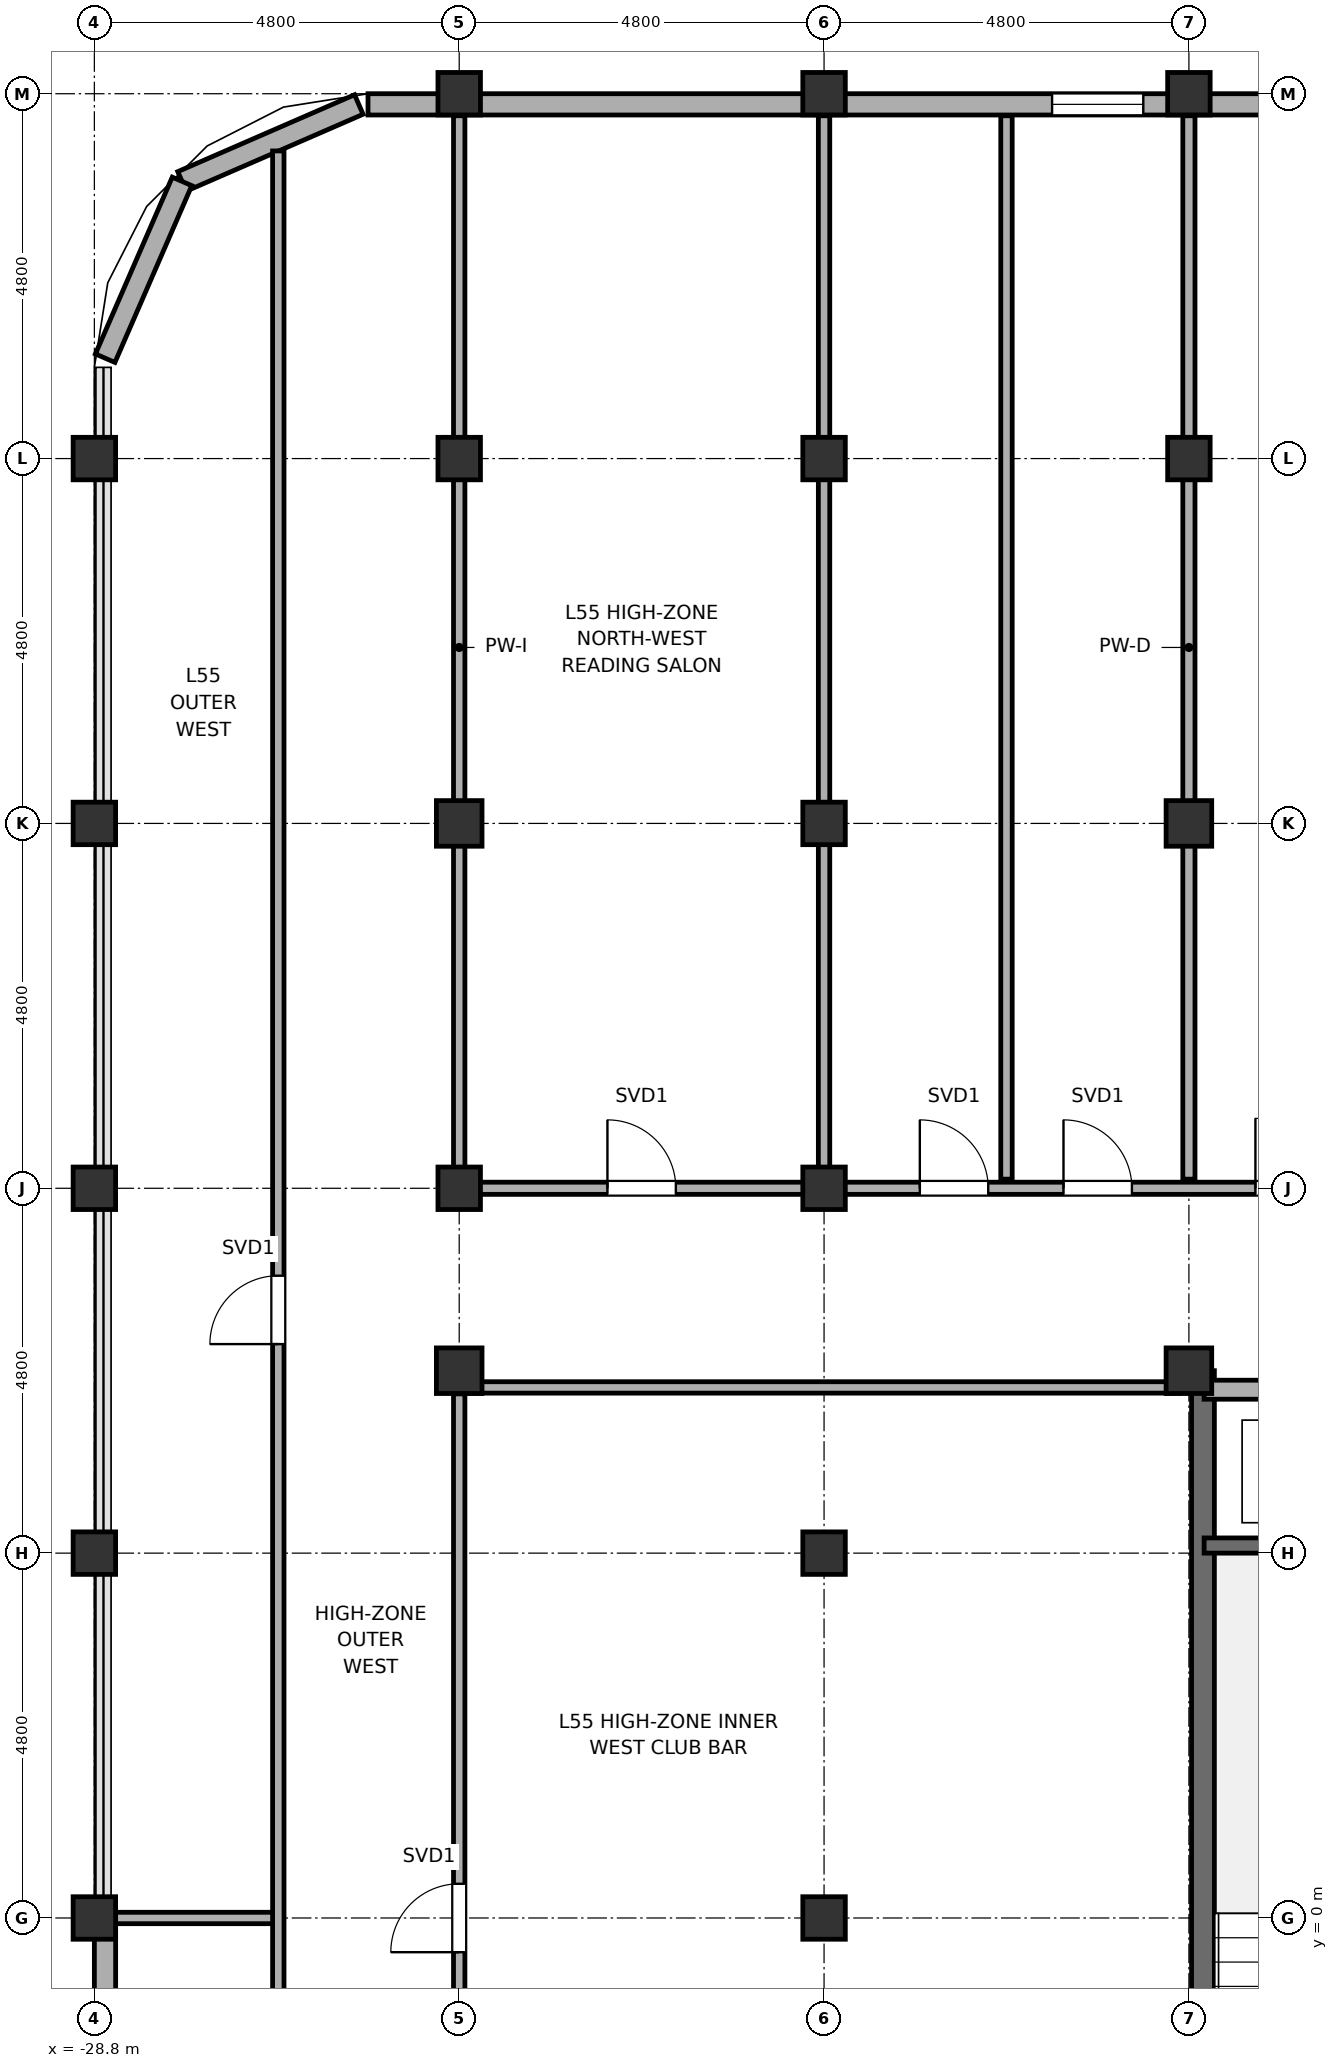
"""IFC4 building model, lengths in metres.
Left out: names, types, materials, properties, quantities, classifications, styles, units other than length and angle.
Written with IfcOpenShell. Run it as: python <this file> out.ifc"""

import sys

from ifc_helpers import new_model, si_unit, direction, frame, frame_2d, origin, origin_2d, place, context, subcontext, project, spatial, rectangle, hollow_rectangle, hollow_circle, extrude, element, fill, save


model = new_model("IFC4")
c1 = context("Model", 3, precision=1e-05, world=origin(), true_north=direction((0.0, 1.0)))
c2 = subcontext(c1, "Body", "Model", "MODEL_VIEW")
j1 = project(units=[si_unit("LENGTHUNIT", "METRE"), si_unit("PLANEANGLEUNIT", "RADIAN")], contexts=[c1])
p1 = place(None, origin())
s1 = spatial("IfcSite", under=j1, at=p1, CompositionType="ELEMENT")
p2 = place(p1, origin())
s2 = spatial("IfcBuilding", under=s1, at=p2, CompositionType="ELEMENT")
p3 = place(p2, frame((0.0, 0.0, 222.3)))
s3 = spatial("IfcBuildingStorey", under=s2, at=p3, CompositionType="ELEMENT", Elevation=222.3)
for number, where, z_axis, x_axis in (
    (1, (-28.8, 0.0, 0.0), (0.0, 0.0, 1.0), (1.0, 0.0, 0.0)),
    (2, (-28.8, 4.8, 0.0), (0.0, 0.0, 1.0), (1.0, 0.0, 0.0)),
    (3, (-28.8, 9.6, 0.0), (0.0, 0.0, 1.0), (1.0, 0.0, 0.0)),
    (4, (-28.8, 14.4, 0.0), (0.0, 0.0, 1.0), (1.0, 0.0, 0.0)),
    (5, (-28.8, 19.2, 0.0), (0.0, 0.0, 1.0), (1.0, 0.0, 0.0)),
):
    element("IfcColumn", number, at=place(p3, frame(where, z_axis=z_axis, x_axis=x_axis)), inside=s3, PredefinedType="COLUMN", context=c2, shape_type="SweptSolid", body=[
        extrude(hollow_circle(Radius=0.28, WallThickness=0.025, at=origin_2d()), origin(), (0.0, 0.0, 1.0), 3.85),
    ])
p4 = place(p3, frame((-24.0, 7.2, 0.0), z_axis=(0.0, 0.0, 1.0), x_axis=(1.0, 0.0, 0.0)))
e6 = element("IfcColumn", 6, at=p4, inside=s3, PredefinedType="COLUMN", context=c2, shape_type="SweptSolid", body=[
    extrude(hollow_rectangle(XDim=0.6, YDim=0.6, WallThickness=0.028, at=origin_2d()), origin(), (0.0, 0.0, 1.0), 3.85),
])
p5 = place(p3, frame((-24.0, 9.6, 0.0), z_axis=(0.0, 0.0, 1.0), x_axis=(1.0, 0.0, 0.0)))
e7 = element("IfcColumn", 7, at=p5, inside=s3, PredefinedType="COLUMN", context=c2, shape_type="SweptSolid", body=[
    extrude(hollow_circle(Radius=0.28, WallThickness=0.025, at=origin_2d()), origin(), (0.0, 0.0, 1.0), 3.85),
])
p6 = place(p3, frame((-24.0, 14.4, 0.0), z_axis=(0.0, 0.0, 1.0), x_axis=(1.0, 0.0, 0.0)))
e8 = element("IfcColumn", 8, at=p6, inside=s3, PredefinedType="COLUMN", context=c2, shape_type="SweptSolid", body=[
    extrude(hollow_rectangle(XDim=0.6, YDim=0.6, WallThickness=0.028, at=origin_2d()), origin(), (0.0, 0.0, 1.0), 3.85),
])
p7 = place(p3, frame((-24.0, 19.2, 0.0), z_axis=(0.0, 0.0, 1.0), x_axis=(1.0, 0.0, 0.0)))
e9 = element("IfcColumn", 9, at=p7, inside=s3, PredefinedType="COLUMN", context=c2, shape_type="SweptSolid", body=[
    extrude(hollow_circle(Radius=0.28, WallThickness=0.025, at=origin_2d()), origin(), (0.0, 0.0, 1.0), 3.85),
])
p8 = place(p3, frame((-24.0, 24.0, -0.18), z_axis=(0.0, 0.0, 1.0), x_axis=(1.0, 0.0, 0.0)))
e10 = element("IfcColumn", 10, at=p8, inside=s3, PredefinedType="COLUMN", context=c2, shape_type="SweptSolid", body=[
    extrude(hollow_circle(Radius=0.28, WallThickness=0.025, at=origin_2d()), origin(), (0.0, 0.0, 1.0), 4.03),
])
for number, where, z_axis, x_axis in (
    (11, (-19.2, 0.0, 0.0), (0.0, 0.0, 1.0), (1.0, 0.0, 0.0)),
    (12, (-19.2, 4.8, 0.0), (0.0, 0.0, 1.0), (1.0, 0.0, 0.0)),
    (13, (-19.2, 9.6, 0.0), (0.0, 0.0, 1.0), (1.0, 0.0, 0.0)),
    (14, (-19.2, 14.4, 0.0), (0.0, 0.0, 1.0), (1.0, 0.0, 0.0)),
    (15, (-19.2, 19.2, 0.0), (0.0, 0.0, 1.0), (1.0, 0.0, 0.0)),
):
    element("IfcColumn", number, at=place(p3, frame(where, z_axis=z_axis, x_axis=x_axis)), inside=s3, PredefinedType="COLUMN", context=c2, shape_type="SweptSolid", body=[
        extrude(hollow_circle(Radius=0.28, WallThickness=0.025, at=origin_2d()), origin(), (0.0, 0.0, 1.0), 3.85),
    ])
p9 = place(p3, frame((-19.2, 24.0, -0.18), z_axis=(0.0, 0.0, 1.0), x_axis=(1.0, 0.0, 0.0)))
e16 = element("IfcColumn", 16, at=p9, inside=s3, PredefinedType="COLUMN", context=c2, shape_type="SweptSolid", body=[
    extrude(hollow_circle(Radius=0.28, WallThickness=0.025, at=origin_2d()), origin(), (0.0, 0.0, 1.0), 4.03),
])
for number, where, z_axis, x_axis in (
    (17, (-14.4, 7.2, 0.0), (0.0, 0.0, 1.0), (1.0, 0.0, 0.0)),
    (18, (-14.4, 14.4, 0.0), (0.0, 0.0, 1.0), (1.0, 0.0, 0.0)),
):
    element("IfcColumn", number, at=place(p3, frame(where, z_axis=z_axis, x_axis=x_axis)), inside=s3, PredefinedType="COLUMN", context=c2, shape_type="SweptSolid", body=[
        extrude(hollow_rectangle(XDim=0.6, YDim=0.6, WallThickness=0.028, at=origin_2d()), origin(), (0.0, 0.0, 1.0), 3.85),
    ])
p10 = place(p3, frame((-14.4, 19.2, 0.0), z_axis=(0.0, 0.0, 1.0), x_axis=(1.0, 0.0, 0.0)))
e19 = element("IfcColumn", 19, at=p10, inside=s3, PredefinedType="COLUMN", context=c2, shape_type="SweptSolid", body=[
    extrude(hollow_circle(Radius=0.28, WallThickness=0.025, at=origin_2d()), origin(), (0.0, 0.0, 1.0), 3.85),
])
p11 = place(p3, frame((-14.4, 24.0, -0.18), z_axis=(0.0, 0.0, 1.0), x_axis=(1.0, 0.0, 0.0)))
e20 = element("IfcColumn", 20, at=p11, inside=s3, PredefinedType="COLUMN", context=c2, shape_type="SweptSolid", body=[
    extrude(hollow_circle(Radius=0.28, WallThickness=0.025, at=origin_2d()), origin(), (0.0, 0.0, 1.0), 4.03),
])
p12 = place(p3, frame((-14.215, -7.2, -0.18), z_axis=(0.0, 0.0, 1.0), x_axis=(0.0, 1.0, 0.0)))
e21 = element("IfcWall", 21, at=p12, inside=s3, PredefinedType="SHEAR", context=c2, shape_type="SweptSolid", body=[
    extrude(rectangle(XDim=14.4, YDim=0.3, at=frame_2d((7.2, 0.0))), origin(), (0.0, 0.0, 1.0), 3.85),
])
p13 = place(p3, frame((-25.321, 23.858, 0.0), z_axis=(0.0, 0.0, 1.0), x_axis=(-0.917060872934, -0.398747232384, 0.0)))
e22 = element("IfcWall", 22, at=p13, inside=s3, PredefinedType="SOLIDWALL", context=c2, shape_type="SweptSolid", body=[
    extrude(rectangle(XDim=2.536, YDim=0.28, at=frame_2d((1.268, 0.0))), origin(), (0.0, 0.0, 1.0), 2.27),
])
p14 = place(p3, frame((-27.646, 22.847, 0.0), z_axis=(0.0, 0.0, 1.0), x_axis=(-0.398792985289, -0.917040977756, 0.0)))
e23 = element("IfcWall", 23, at=p14, inside=s3, PredefinedType="SOLIDWALL", context=c2, shape_type="SweptSolid", body=[
    extrude(rectangle(XDim=2.536, YDim=0.28, at=frame_2d((1.268, 0.0))), origin(), (0.0, 0.0, 1.0), 2.27),
])
p15 = place(p3, frame((-25.2, 23.86, 0.0), z_axis=(0.0, 0.0, 1.0), x_axis=(1.0, 0.0, 0.0)))
e24 = element("IfcWall", 24, at=p15, inside=s3, PredefinedType="SOLIDWALL", context=c2, shape_type="SweptSolid", body=[
    extrude(rectangle(XDim=20.45, YDim=0.28, at=frame_2d((10.225, 0.0))), origin(), (0.0, 0.0, 1.0), 2.27),
])
p16 = place(p15, frame((9.0, 0.0, 0.75)))
e25 = element("IfcOpeningElement", 25, at=p16, cuts=e24, PredefinedType="OPENING", context=c2, shape_type="SweptSolid", body=[
    extrude(rectangle(XDim=1.2, YDim=1.15, at=frame_2d((0.6, 0.575))), frame((0.0, 0.155, 0.0), z_axis=(0.0, -1.0, 0.0), x_axis=(1.0, 0.0, 0.0)), (0.0, 0.0, 1.0), 0.31),
])
p17 = place(p15, frame((12.6, 0.0, 0.75)))
e26 = element("IfcOpeningElement", 26, at=p17, cuts=e24, PredefinedType="OPENING", context=c2, shape_type="SweptSolid", body=[
    extrude(rectangle(XDim=1.2, YDim=1.15, at=frame_2d((0.6, 0.575))), frame((0.0, 0.155, 0.0), z_axis=(0.0, -1.0, 0.0), x_axis=(1.0, 0.0, 0.0)), (0.0, 0.0, 1.0), 0.31),
])
p18 = place(p15, frame((17.4, 0.0, 0.75)))
e27 = element("IfcOpeningElement", 27, at=p18, cuts=e24, PredefinedType="OPENING", context=c2, shape_type="SweptSolid", body=[
    extrude(rectangle(XDim=1.2, YDim=1.15, at=frame_2d((0.6, 0.575))), frame((0.0, 0.155, 0.0), z_axis=(0.0, -1.0, 0.0), x_axis=(1.0, 0.0, 0.0)), (0.0, 0.0, 1.0), 0.31),
])
p19 = place(p3, frame((-28.66, -15.6, 0.0), z_axis=(0.0, 0.0, 1.0), x_axis=(0.0, 1.0, 0.0)))
e28 = element("IfcWall", 28, at=p19, inside=s3, PredefinedType="SOLIDWALL", context=c2, shape_type="SweptSolid", body=[
    extrude(rectangle(XDim=15.58, YDim=0.28, at=frame_2d((7.79, 0.0))), origin(), (0.0, 0.0, 1.0), 2.27),
])
p20 = place(p19, frame((12.45, 0.0, 0.75)))
e29 = element("IfcOpeningElement", 29, at=p20, cuts=e28, PredefinedType="OPENING", context=c2, shape_type="SweptSolid", body=[
    extrude(rectangle(XDim=1.5, YDim=1.15, at=frame_2d((0.75, 0.575))), frame((0.0, 0.155, 0.0), z_axis=(0.0, -1.0, 0.0), x_axis=(1.0, 0.0, 0.0)), (0.0, 0.0, 1.0), 0.31),
])
p21 = place(p3, frame((-14.2, 6.95, 0.0), z_axis=(0.0, 0.0, 1.0), x_axis=(1.0, 0.0, 0.0)))
e30 = element("IfcWall", 30, at=p21, inside=s3, PredefinedType="SOLIDWALL", context=c2, shape_type="SweptSolid", body=[
    extrude(rectangle(XDim=9.4, YDim=0.25, at=frame_2d((4.7, 0.0))), origin(), (0.0, 0.0, 1.0), 2.27),
])
p22 = place(p21, frame((4.9, 0.0, 0.0)))
e31 = element("IfcOpeningElement", 31, at=p22, cuts=e30, PredefinedType="OPENING", context=c2, shape_type="SweptSolid", body=[
    extrude(rectangle(XDim=1.0, YDim=2.15, at=frame_2d((0.5, 1.075))), frame((0.0, 0.14, 0.0), z_axis=(0.0, -1.0, 0.0), x_axis=(1.0, 0.0, 0.0)), (0.0, 0.0, 1.0), 0.28),
])
p23 = place(p3, frame((-14.2, 4.9, -0.18), z_axis=(0.0, 0.0, 1.0), x_axis=(1.0, 0.0, 0.0)))
e32 = element("IfcWall", 32, at=p23, inside=s3, PredefinedType="SOLIDWALL", context=c2, shape_type="SweptSolid", body=[
    extrude(rectangle(XDim=3.65, YDim=0.2, at=frame_2d((1.825, 0.0))), origin(), (0.0, 0.0, 1.0), 3.85),
])
p24 = place(p3, frame((-28.63, 0.0, 0.0), z_axis=(0.0, 0.0, 1.0), x_axis=(1.0, 0.0, 0.0)))
e33 = element("IfcWall", 33, at=p24, inside=s3, PredefinedType="PARTITIONING", context=c2, shape_type="SweptSolid", body=[
    extrude(rectangle(XDim=2.25, YDim=0.15, at=frame_2d((1.125, 0.0))), origin(), (0.0, 0.0, 1.0), 3.12),
])
p25 = place(p3, frame((-23.92, 6.98, 0.0), z_axis=(0.0, 0.0, 1.0), x_axis=(1.0, 0.0, 0.0)))
e34 = element("IfcWall", 34, at=p25, inside=s3, PredefinedType="PARTITIONING", context=c2, shape_type="SweptSolid", body=[
    extrude(rectangle(XDim=9.4, YDim=0.15, at=frame_2d((4.7, 0.0))), origin(), (0.0, 0.0, 1.0), 2.27),
])
p26 = place(p3, frame((-23.92, 9.6, 0.0), z_axis=(0.0, 0.0, 1.0), x_axis=(1.0, 0.0, 0.0)))
e35 = element("IfcWall", 35, at=p26, inside=s3, PredefinedType="PARTITIONING", context=c2, shape_type="SweptSolid", body=[
    extrude(rectangle(XDim=47.84, YDim=0.16, at=frame_2d((23.92, 0.0))), origin(), (0.0, 0.0, 1.0), 2.27),
])
p27 = place(p26, frame((1.87, 0.0, 0.0)))
e36 = element("IfcOpeningElement", 36, at=p27, cuts=e35, PredefinedType="OPENING", context=c2, shape_type="SweptSolid", body=[
    extrude(rectangle(XDim=0.9, YDim=2.1, at=frame_2d((0.45, 1.05))), frame((0.0, 0.095, 0.0), z_axis=(0.0, -1.0, 0.0), x_axis=(1.0, 0.0, 0.0)), (0.0, 0.0, 1.0), 0.19),
])
p28 = place(p26, frame((45.07, 0.0, 0.0)))
e37 = element("IfcOpeningElement", 37, at=p28, cuts=e35, PredefinedType="OPENING", context=c2, shape_type="SweptSolid", body=[
    extrude(rectangle(XDim=0.9, YDim=2.1, at=frame_2d((0.45, 1.05))), frame((0.0, 0.095, 0.0), z_axis=(0.0, -1.0, 0.0), x_axis=(1.0, 0.0, 0.0)), (0.0, 0.0, 1.0), 0.19),
])
p29 = place(p26, frame((5.98, 0.0, 0.0)))
e38 = element("IfcOpeningElement", 38, at=p29, cuts=e35, PredefinedType="OPENING", context=c2, shape_type="SweptSolid", body=[
    extrude(rectangle(XDim=0.9, YDim=2.1, at=frame_2d((0.45, 1.05))), frame((0.0, 0.095, 0.0), z_axis=(0.0, -1.0, 0.0), x_axis=(1.0, 0.0, 0.0)), (0.0, 0.0, 1.0), 0.19),
])
p30 = place(p26, frame((7.87, 0.0, 0.0)))
e39 = element("IfcOpeningElement", 39, at=p30, cuts=e35, PredefinedType="OPENING", context=c2, shape_type="SweptSolid", body=[
    extrude(rectangle(XDim=0.9, YDim=2.1, at=frame_2d((0.45, 1.05))), frame((0.0, 0.095, 0.0), z_axis=(0.0, -1.0, 0.0), x_axis=(1.0, 0.0, 0.0)), (0.0, 0.0, 1.0), 0.19),
])
p31 = place(p26, frame((10.395, 0.0, 0.0)))
e40 = element("IfcOpeningElement", 40, at=p31, cuts=e35, PredefinedType="OPENING", context=c2, shape_type="SweptSolid", body=[
    extrude(rectangle(XDim=0.92, YDim=2.15, at=frame_2d((0.46, 1.075))), frame((0.0, 0.095, 0.0), z_axis=(0.0, -1.0, 0.0), x_axis=(1.0, 0.0, 0.0)), (0.0, 0.0, 1.0), 0.19),
])
p32 = place(p26, frame((17.325, 0.0, 0.0)))
e41 = element("IfcOpeningElement", 41, at=p32, cuts=e35, PredefinedType="OPENING", context=c2, shape_type="SweptSolid", body=[
    extrude(rectangle(XDim=0.92, YDim=2.15, at=frame_2d((0.46, 1.075))), frame((0.0, 0.095, 0.0), z_axis=(0.0, -1.0, 0.0), x_axis=(1.0, 0.0, 0.0)), (0.0, 0.0, 1.0), 0.19),
])
p33 = place(p26, frame((21.07, 0.0, 0.0)))
e42 = element("IfcOpeningElement", 42, at=p33, cuts=e35, PredefinedType="OPENING", context=c2, shape_type="SweptSolid", body=[
    extrude(rectangle(XDim=0.9, YDim=2.1, at=frame_2d((0.45, 1.05))), frame((0.0, 0.095, 0.0), z_axis=(0.0, -1.0, 0.0), x_axis=(1.0, 0.0, 0.0)), (0.0, 0.0, 1.0), 0.19),
])
p34 = place(p26, frame((35.47, 0.0, 0.0)))
e43 = element("IfcOpeningElement", 43, at=p34, cuts=e35, PredefinedType="OPENING", context=c2, shape_type="SweptSolid", body=[
    extrude(rectangle(XDim=0.9, YDim=2.1, at=frame_2d((0.45, 1.05))), frame((0.0, 0.095, 0.0), z_axis=(0.0, -1.0, 0.0), x_axis=(1.0, 0.0, 0.0)), (0.0, 0.0, 1.0), 0.19),
])
p35 = place(p3, frame((-26.38, -18.447, 0.0), z_axis=(0.0, 0.0, 1.0), x_axis=(0.0, 1.0, 0.0)))
e44 = element("IfcWall", 44, at=p35, inside=s3, PredefinedType="PARTITIONING", context=c2, shape_type="SweptSolid", body=[
    extrude(rectangle(XDim=41.695, YDim=0.15, at=frame_2d((20.847, 0.0))), origin(), (0.0, 0.0, 1.0), 2.27),
])
p36 = place(p35, frame((9.997, 0.0, 0.0)))
e45 = element("IfcOpeningElement", 45, at=p36, cuts=e44, PredefinedType="OPENING", context=c2, shape_type="SweptSolid", body=[
    extrude(rectangle(XDim=0.9, YDim=2.1, at=frame_2d((0.45, 1.05))), frame((0.0, 0.09, 0.0), z_axis=(0.0, -1.0, 0.0), x_axis=(1.0, 0.0, 0.0)), (0.0, 0.0, 1.0), 0.18),
])
p37 = place(p35, frame((25.997, 0.0, 0.0)))
e46 = element("IfcOpeningElement", 46, at=p37, cuts=e44, PredefinedType="OPENING", context=c2, shape_type="SweptSolid", body=[
    extrude(rectangle(XDim=0.9, YDim=2.1, at=frame_2d((0.45, 1.05))), frame((0.0, 0.09, 0.0), z_axis=(0.0, -1.0, 0.0), x_axis=(1.0, 0.0, 0.0)), (0.0, 0.0, 1.0), 0.18),
])
p38 = place(p3, frame((-24.0, -6.835, 0.0), z_axis=(0.0, 0.0, 1.0), x_axis=(0.0, 1.0, 0.0)))
e47 = element("IfcWall", 47, at=p38, inside=s3, PredefinedType="PARTITIONING", context=c2, shape_type="SweptSolid", body=[
    extrude(rectangle(XDim=13.73, YDim=0.15, at=frame_2d((6.865, 0.0))), origin(), (0.0, 0.0, 1.0), 2.27),
])
p39 = place(p38, frame((6.385, 0.0, 0.0)))
e48 = element("IfcOpeningElement", 48, at=p39, cuts=e47, PredefinedType="OPENING", context=c2, shape_type="SweptSolid", body=[
    extrude(rectangle(XDim=0.9, YDim=2.1, at=frame_2d((0.45, 1.05))), frame((0.0, 0.09, 0.0), z_axis=(0.0, -1.0, 0.0), x_axis=(1.0, 0.0, 0.0)), (0.0, 0.0, 1.0), 0.18),
])
for number, where, z_axis, x_axis in (
    (49, (-24.0, 9.72, 0.0), (0.0, 0.0, 1.0), (0.0, 1.0, 0.0)),
    (50, (-19.2, 9.72, 0.0), (0.0, 0.0, 1.0), (0.0, 1.0, 0.0)),
    (51, (-16.8, 9.72, 0.0), (0.0, 0.0, 1.0), (0.0, 1.0, 0.0)),
):
    element("IfcWall", number, at=place(p3, frame(where, z_axis=z_axis, x_axis=x_axis)), inside=s3, PredefinedType="PARTITIONING", context=c2, shape_type="SweptSolid", body=[
        extrude(rectangle(XDim=13.99, YDim=0.15, at=frame_2d((6.995, 0.0))), origin(), (0.0, 0.0, 1.0), 2.27),
    ])
p40 = place(p3, frame((-14.4, 9.72, 0.0), z_axis=(0.0, 0.0, 1.0), x_axis=(0.0, 1.0, 0.0)))
e52 = element("IfcWall", 52, at=p40, inside=s3, PredefinedType="PARTITIONING", context=c2, shape_type="SweptSolid", body=[
    extrude(rectangle(XDim=13.99, YDim=0.16, at=frame_2d((6.995, 0.0))), origin(), (0.0, 0.0, 1.0), 2.27),
])
p41 = place(p16, origin())
e53 = element("IfcWindow", 53, at=p41, inside=s3, PartitioningType="SINGLE_PANEL", PredefinedType="WINDOW", context=c2, shape_type="SweptSolid", body=[
    extrude(rectangle(XDim=1.2, YDim=1.15, at=frame_2d((0.6, 0.575))), frame((0.0, 0.03, 0.0), z_axis=(0.0, -1.0, 0.0), x_axis=(1.0, 0.0, 0.0)), (0.0, 0.0, 1.0), 0.06),
])
fill(e25, e53)
p42 = place(p39, origin())
e54 = element("IfcDoor", 54, at=p42, inside=s3, OperationType="SINGLE_SWING_RIGHT", PredefinedType="DOOR", context=c2, shape_type="SweptSolid", body=[
    extrude(rectangle(XDim=0.9, YDim=2.1, at=frame_2d((0.45, 1.05))), frame((0.0, 0.025, 0.0), z_axis=(0.0, -1.0, 0.0), x_axis=(1.0, 0.0, 0.0)), (0.0, 0.0, 1.0), 0.05),
])
fill(e48, e54)
p43 = place(p27, origin())
e55 = element("IfcDoor", 55, at=p43, inside=s3, OperationType="SINGLE_SWING_RIGHT", PredefinedType="DOOR", context=c2, shape_type="SweptSolid", body=[
    extrude(rectangle(XDim=0.9, YDim=2.1, at=frame_2d((0.45, 1.05))), frame((0.0, 0.025, 0.0), z_axis=(0.0, -1.0, 0.0), x_axis=(1.0, 0.0, 0.0)), (0.0, 0.0, 1.0), 0.05),
])
fill(e36, e55)
p44 = place(p37, origin())
e56 = element("IfcDoor", 56, at=p44, inside=s3, OperationType="SINGLE_SWING_LEFT", PredefinedType="DOOR", context=c2, shape_type="SweptSolid", body=[
    extrude(rectangle(XDim=0.9, YDim=2.1, at=frame_2d((0.45, 1.05))), frame((0.0, 0.025, 0.0), z_axis=(0.0, -1.0, 0.0), x_axis=(1.0, 0.0, 0.0)), (0.0, 0.0, 1.0), 0.05),
])
fill(e46, e56)
p45 = place(p29, origin())
e57 = element("IfcDoor", 57, at=p45, inside=s3, OperationType="SINGLE_SWING_RIGHT", PredefinedType="DOOR", context=c2, shape_type="SweptSolid", body=[
    extrude(rectangle(XDim=0.9, YDim=2.1, at=frame_2d((0.45, 1.05))), frame((0.0, 0.025, 0.0), z_axis=(0.0, -1.0, 0.0), x_axis=(1.0, 0.0, 0.0)), (0.0, 0.0, 1.0), 0.05),
])
fill(e38, e57)
p46 = place(p30, origin())
e58 = element("IfcDoor", 58, at=p46, inside=s3, OperationType="SINGLE_SWING_RIGHT", PredefinedType="DOOR", context=c2, shape_type="SweptSolid", body=[
    extrude(rectangle(XDim=0.9, YDim=2.1, at=frame_2d((0.45, 1.05))), frame((0.0, 0.025, 0.0), z_axis=(0.0, -1.0, 0.0), x_axis=(1.0, 0.0, 0.0)), (0.0, 0.0, 1.0), 0.05),
])
fill(e39, e58)
p47 = place(p31, origin())
e59 = element("IfcDoor", 59, at=p47, inside=s3, OperationType="SINGLE_SWING_LEFT", PredefinedType="DOOR", context=c2, shape_type="SweptSolid", body=[
    extrude(rectangle(XDim=0.92, YDim=2.15, at=frame_2d((0.46, 1.075))), frame((0.0, 0.025, 0.0), z_axis=(0.0, -1.0, 0.0), x_axis=(1.0, 0.0, 0.0)), (0.0, 0.0, 1.0), 0.05),
])
fill(e40, e59)
save(model, sys.argv[1])
